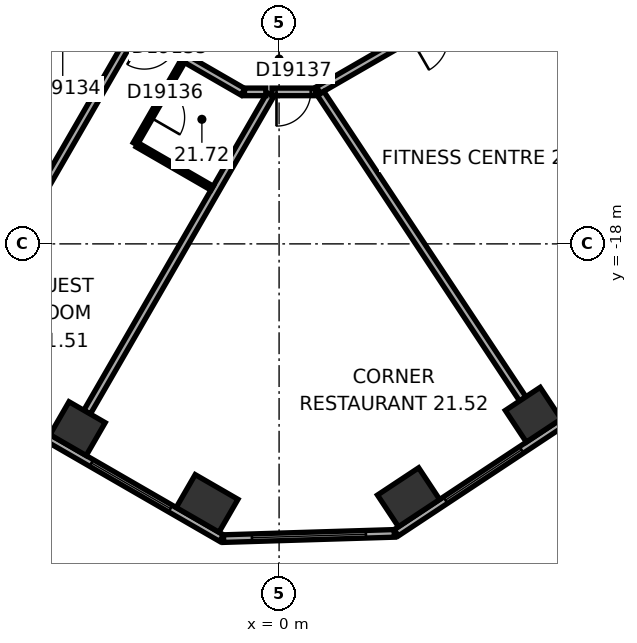
"""IFC4 building model, lengths in metres.
Left out: names, types, materials, properties, quantities, classifications, styles, units other than length and angle.
Written with IfcOpenShell. Run it as: python <this file> out.ifc"""

import sys

from ifc_helpers import new_model, si_unit, direction, frame, frame_2d, origin, origin_2d, place, context, subcontext, project, spatial, rectangle, extrude, element, fill, save


model = new_model("IFC4")
c1 = context("Model", 3, precision=1e-05, world=origin(), true_north=direction((0.0, 1.0)))
c2 = subcontext(c1, "Body", "Model", "MODEL_VIEW")
j1 = project(units=[si_unit("LENGTHUNIT", "METRE"), si_unit("PLANEANGLEUNIT", "RADIAN")], contexts=[c1])
p1 = place(None, origin())
s1 = spatial("IfcSite", under=j1, at=p1, CompositionType="ELEMENT")
p2 = place(p1, origin())
s2 = spatial("IfcBuilding", under=s1, at=p2, CompositionType="ELEMENT")
p3 = place(p2, frame((0.0, 0.0, 93.5)))
s3 = spatial("IfcBuildingStorey", under=s2, at=p3, CompositionType="ELEMENT", Elevation=93.5)
p4 = place(p3, frame((-5.302, -22.862, 0.0), z_axis=(0.0, 0.0, 1.0), x_axis=(0.866025403784, -0.5, 0.0)))
e1 = element("IfcColumn", 1, at=p4, inside=s3, PredefinedType="COLUMN", context=c2, shape_type="SweptSolid", body=[
    extrude(rectangle(XDim=1.1, YDim=1.0, at=origin_2d()), origin(), (0.0, 0.0, 1.0), 3.3),
])
for number, where, z_axis, x_axis in (
    (2, (-1.895, -24.829, 0.0), (0.0, 0.0, 1.0), (0.866, -0.5, 0.0)),
    (3, (3.407, -24.667, 0.0), (0.0, 0.0, 1.0), (0.834, 0.552, 0.0)),
):
    element("IfcColumn", number, at=place(p3, frame(where, z_axis=z_axis, x_axis=x_axis)), inside=s3, PredefinedType="COLUMN", context=c2, shape_type="SweptSolid", body=[
        extrude(rectangle(XDim=1.3, YDim=1.0, at=origin_2d()), origin(), (0.0, 0.0, 1.0), 3.3),
    ])
p5 = place(p3, frame((6.688, -22.496, 0.0), z_axis=(0.0, 0.0, 1.0), x_axis=(0.833885822067, 0.551936985312, 0.0)))
e4 = element("IfcColumn", 4, at=p5, inside=s3, PredefinedType="COLUMN", context=c2, shape_type="SweptSolid", body=[
    extrude(rectangle(XDim=1.1, YDim=1.0, at=origin_2d()), origin(), (0.0, 0.0, 1.0), 3.3),
])
p6 = place(p3, frame((-19.914, -15.119, 0.0), z_axis=(0.0, 0.0, 1.0), x_axis=(0.866025418898, -0.499999973822, 0.0)))
e5 = element("IfcWall", 5, at=p6, inside=s3, PredefinedType="STANDARD", context=c2, shape_type="SweptSolid", body=[
    extrude(rectangle(XDim=21.246, YDim=0.2, at=frame_2d((10.623, 0.0))), origin(), (0.0, 0.0, 1.0), 3.3),
])
p7 = place(p6, frame((1.555, 0.0, 0.8)))
e6 = element("IfcOpeningElement", 6, at=p7, cuts=e5, PredefinedType="OPENING", context=c2, shape_type="SweptSolid", body=[
    extrude(rectangle(XDim=2.4, YDim=1.7, at=frame_2d((1.2, 0.85))), frame((0.0, 0.11, 0.0), z_axis=(0.0, -1.0, 0.0), x_axis=(1.0, 0.0, 0.0)), (0.0, 0.0, 1.0), 0.22),
])
p8 = place(p6, frame((5.489, 0.0, 0.8)))
e7 = element("IfcOpeningElement", 7, at=p8, cuts=e5, PredefinedType="OPENING", context=c2, shape_type="SweptSolid", body=[
    extrude(rectangle(XDim=2.4, YDim=1.7, at=frame_2d((1.2, 0.85))), frame((0.0, 0.11, 0.0), z_axis=(0.0, -1.0, 0.0), x_axis=(1.0, 0.0, 0.0)), (0.0, 0.0, 1.0), 0.22),
])
p9 = place(p6, frame((9.424, 0.0, 0.8)))
e8 = element("IfcOpeningElement", 8, at=p9, cuts=e5, PredefinedType="OPENING", context=c2, shape_type="SweptSolid", body=[
    extrude(rectangle(XDim=2.4, YDim=1.7, at=frame_2d((1.2, 0.85))), frame((0.0, 0.11, 0.0), z_axis=(0.0, -1.0, 0.0), x_axis=(1.0, 0.0, 0.0)), (0.0, 0.0, 1.0), 0.22),
])
p10 = place(p6, frame((13.358, 0.0, 0.8)))
e9 = element("IfcOpeningElement", 9, at=p10, cuts=e5, PredefinedType="OPENING", context=c2, shape_type="SweptSolid", body=[
    extrude(rectangle(XDim=2.4, YDim=1.7, at=frame_2d((1.2, 0.85))), frame((0.0, 0.11, 0.0), z_axis=(0.0, -1.0, 0.0), x_axis=(1.0, 0.0, 0.0)), (0.0, 0.0, 1.0), 0.22),
])
p11 = place(p6, frame((17.293, 0.0, 0.8)))
e10 = element("IfcOpeningElement", 10, at=p11, cuts=e5, PredefinedType="OPENING", context=c2, shape_type="SweptSolid", body=[
    extrude(rectangle(XDim=2.4, YDim=1.7, at=frame_2d((1.2, 0.85))), frame((0.0, 0.11, 0.0), z_axis=(0.0, -1.0, 0.0), x_axis=(1.0, 0.0, 0.0)), (0.0, 0.0, 1.0), 0.22),
])
p12 = place(p3, frame((-1.461, -25.755, 0.0), z_axis=(0.0, 0.0, 1.0), x_axis=(0.999533823446, 0.030530898895, 0.0)))
e11 = element("IfcWall", 11, at=p12, inside=s3, PredefinedType="STANDARD", context=c2, shape_type="SweptSolid", body=[
    extrude(rectangle(XDim=4.494, YDim=0.2, at=frame_2d((2.247, 0.0))), origin(), (0.0, 0.0, 1.0), 3.3),
])
p13 = place(p12, frame((0.747, 0.0, 0.8)))
e12 = element("IfcOpeningElement", 12, at=p13, cuts=e11, PredefinedType="OPENING", context=c2, shape_type="SweptSolid", body=[
    extrude(rectangle(XDim=3.0, YDim=1.7, at=frame_2d((1.5, 0.85))), frame((0.0, 0.11, 0.0), z_axis=(0.0, -1.0, 0.0), x_axis=(1.0, 0.0, 0.0)), (0.0, 0.0, 1.0), 0.22),
])
p14 = place(p3, frame((3.083, -25.601, 0.0), z_axis=(0.0, 0.0, 1.0), x_axis=(0.833884295743, 0.551939291329, 0.0)))
e13 = element("IfcWall", 13, at=p14, inside=s3, PredefinedType="STANDARD", context=c2, shape_type="SweptSolid", body=[
    extrude(rectangle(XDim=21.246, YDim=0.2, at=frame_2d((10.623, 0.0))), origin(), (0.0, 0.0, 1.0), 3.3),
])
p15 = place(p14, frame((1.553, 0.0, 0.8)))
e14 = element("IfcOpeningElement", 14, at=p15, cuts=e13, PredefinedType="OPENING", context=c2, shape_type="SweptSolid", body=[
    extrude(rectangle(XDim=2.4, YDim=1.7, at=frame_2d((1.2, 0.85))), frame((0.0, 0.11, 0.0), z_axis=(0.0, -1.0, 0.0), x_axis=(1.0, 0.0, 0.0)), (0.0, 0.0, 1.0), 0.22),
])
p16 = place(p14, frame((5.488, 0.0, 0.8)))
e15 = element("IfcOpeningElement", 15, at=p16, cuts=e13, PredefinedType="OPENING", context=c2, shape_type="SweptSolid", body=[
    extrude(rectangle(XDim=2.4, YDim=1.7, at=frame_2d((1.2, 0.85))), frame((0.0, 0.11, 0.0), z_axis=(0.0, -1.0, 0.0), x_axis=(1.0, 0.0, 0.0)), (0.0, 0.0, 1.0), 0.22),
])
p17 = place(p14, frame((9.422, 0.0, 0.8)))
e16 = element("IfcOpeningElement", 16, at=p17, cuts=e13, PredefinedType="OPENING", context=c2, shape_type="SweptSolid", body=[
    extrude(rectangle(XDim=2.4, YDim=1.7, at=frame_2d((1.2, 0.85))), frame((0.0, 0.11, 0.0), z_axis=(0.0, -1.0, 0.0), x_axis=(1.0, 0.0, 0.0)), (0.0, 0.0, 1.0), 0.22),
])
p18 = place(p14, frame((13.357, 0.0, 0.8)))
e17 = element("IfcOpeningElement", 17, at=p18, cuts=e13, PredefinedType="OPENING", context=c2, shape_type="SweptSolid", body=[
    extrude(rectangle(XDim=2.4, YDim=1.7, at=frame_2d((1.2, 0.85))), frame((0.0, 0.11, 0.0), z_axis=(0.0, -1.0, 0.0), x_axis=(1.0, 0.0, 0.0)), (0.0, 0.0, 1.0), 0.22),
])
p19 = place(p14, frame((17.291, 0.0, 0.8)))
e18 = element("IfcOpeningElement", 18, at=p19, cuts=e13, PredefinedType="OPENING", context=c2, shape_type="SweptSolid", body=[
    extrude(rectangle(XDim=2.4, YDim=1.7, at=frame_2d((1.2, 0.85))), frame((0.0, 0.11, 0.0), z_axis=(0.0, -1.0, 0.0), x_axis=(1.0, 0.0, 0.0)), (0.0, 0.0, 1.0), 0.22),
])
p20 = place(p3, frame((-11.615, -7.843, 0.0), z_axis=(0.0, 0.0, 1.0), x_axis=(0.866026466995, -0.499998158461, 0.0)))
e19 = element("IfcWall", 19, at=p20, inside=s3, PredefinedType="PARTITIONING", context=c2, shape_type="SweptSolid", body=[
    extrude(rectangle(XDim=12.315, YDim=0.2, at=frame_2d((6.158, 0.0))), origin(), (0.0, 0.0, 1.0), 3.05),
])
p21 = place(p20, frame((1.665, 0.0, 0.0)))
e20 = element("IfcOpeningElement", 20, at=p21, cuts=e19, PredefinedType="OPENING", context=c2, shape_type="SweptSolid", body=[
    extrude(rectangle(XDim=0.9, YDim=2.1, at=frame_2d((0.45, 1.05))), frame((0.0, 0.11, 0.0), z_axis=(0.0, -1.0, 0.0), x_axis=(1.0, 0.0, 0.0)), (0.0, 0.0, 1.0), 0.22),
])
p22 = place(p20, frame((7.65, 0.0, 0.0)))
e21 = element("IfcOpeningElement", 21, at=p22, cuts=e19, PredefinedType="OPENING", context=c2, shape_type="SweptSolid", body=[
    extrude(rectangle(XDim=0.9, YDim=2.1, at=frame_2d((0.45, 1.05))), frame((0.0, 0.11, 0.0), z_axis=(0.0, -1.0, 0.0), x_axis=(1.0, 0.0, 0.0)), (0.0, 0.0, 1.0), 0.22),
])
p23 = place(p20, frame((9.317, 0.0, 0.0)))
e22 = element("IfcOpeningElement", 22, at=p23, cuts=e19, PredefinedType="OPENING", context=c2, shape_type="SweptSolid", body=[
    extrude(rectangle(XDim=0.9, YDim=2.1, at=frame_2d((0.45, 1.05))), frame((0.0, 0.11, 0.0), z_axis=(0.0, -1.0, 0.0), x_axis=(1.0, 0.0, 0.0)), (0.0, 0.0, 1.0), 0.22),
])
p24 = place(p3, frame((-8.46, -20.461, 0.0), z_axis=(0.0, 0.0, 1.0), x_axis=(0.499999662836, 0.866025598446, 0.0)))
e23 = element("IfcWall", 23, at=p24, inside=s3, PredefinedType="PARTITIONING", context=c2, shape_type="SweptSolid", body=[
    extrude(rectangle(XDim=9.25, YDim=0.2, at=frame_2d((4.625, 0.0))), origin(), (0.0, 0.0, 1.0), 3.05),
])
p25 = place(p3, frame((-5.51, -11.483, 0.0), z_axis=(0.0, 0.0, 1.0), x_axis=(-0.500004234368, -0.866022959057, 0.0)))
e24 = element("IfcWall", 24, at=p25, inside=s3, PredefinedType="PARTITIONING", context=c2, shape_type="SweptSolid", body=[
    extrude(rectangle(XDim=2.5, YDim=0.12, at=frame_2d((1.25, 0.0))), origin(), (0.0, 0.0, 1.0), 3.05),
])
p26 = place(p25, frame((0.8, 0.0, 0.0)))
e25 = element("IfcOpeningElement", 25, at=p26, cuts=e24, PredefinedType="OPENING", context=c2, shape_type="SweptSolid", body=[
    extrude(rectangle(XDim=0.9, YDim=2.1, at=frame_2d((0.45, 1.05))), frame((0.0, 0.07, 0.0), z_axis=(0.0, -1.0, 0.0), x_axis=(1.0, 0.0, 0.0)), (0.0, 0.0, 1.0), 0.14),
])
p27 = place(p3, frame((-5.052, -22.429, 0.0), z_axis=(0.0, 0.0, 1.0), x_axis=(0.50000569793, 0.866022114058, 0.0)))
e26 = element("IfcWall", 26, at=p27, inside=s3, PredefinedType="PARTITIONING", context=c2, shape_type="SweptSolid", body=[
    extrude(rectangle(XDim=9.65, YDim=0.2, at=frame_2d((4.825, 0.0))), origin(), (0.0, 0.0, 1.0), 3.05),
])
p28 = place(p3, frame((-3.786, -15.366, 0.0), z_axis=(0.0, 0.0, 1.0), x_axis=(0.500004234368, 0.866022959057, 0.0)))
e27 = element("IfcWall", 27, at=p28, inside=s3, PredefinedType="PARTITIONING", context=c2, shape_type="SweptSolid", body=[
    extrude(rectangle(XDim=2.5, YDim=0.12, at=frame_2d((1.25, 0.0))), origin(), (0.0, 0.0, 1.0), 3.05),
])
p29 = place(p28, frame((0.8, 0.0, 0.0)))
e28 = element("IfcOpeningElement", 28, at=p29, cuts=e27, PredefinedType="OPENING", context=c2, shape_type="SweptSolid", body=[
    extrude(rectangle(XDim=0.9, YDim=2.1, at=frame_2d((0.45, 1.05))), frame((0.0, 0.07, 0.0), z_axis=(0.0, -1.0, 0.0), x_axis=(1.0, 0.0, 0.0)), (0.0, 0.0, 1.0), 0.14),
])
p30 = place(p3, frame((-1.764, -16.533, 0.0), z_axis=(0.0, 0.0, 1.0), x_axis=(-0.866008641419, 0.500029032144, 0.0)))
e29 = element("IfcWall", 29, at=p30, inside=s3, PredefinedType="PARTITIONING", context=c2, shape_type="SweptSolid", body=[
    extrude(rectangle(XDim=2.275, YDim=0.12, at=frame_2d((1.137, 0.0))), origin(), (0.0, 0.0, 1.0), 3.05),
])
p31 = place(p3, frame((-0.91, -14.001, 0.0), z_axis=(0.0, 0.0, 1.0), x_axis=(1.0, 0.0, 0.0)))
e30 = element("IfcWall", 30, at=p31, inside=s3, PredefinedType="PARTITIONING", context=c2, shape_type="SweptSolid", body=[
    extrude(rectangle(XDim=0.56, YDim=0.2, at=frame_2d((0.28, 0.0))), origin(), (0.0, 0.0, 1.0), 3.05),
])
p32 = place(p3, frame((-0.186, -14.001, 0.0), z_axis=(0.0, 0.0, 1.0), x_axis=(1.0, 0.0, 0.0)))
e31 = element("IfcWall", 31, at=p32, inside=s3, PredefinedType="PARTITIONING", context=c2, shape_type="SweptSolid", body=[
    extrude(rectangle(XDim=1.136, YDim=0.2, at=frame_2d((0.568, 0.0))), origin(), (0.0, 0.0, 1.0), 3.05),
])
p33 = place(p32, frame((0.118, 0.0, 0.0)))
e32 = element("IfcOpeningElement", 32, at=p33, cuts=e31, PredefinedType="OPENING", context=c2, shape_type="SweptSolid", body=[
    extrude(rectangle(XDim=0.9, YDim=2.1, at=frame_2d((0.45, 1.05))), frame((0.0, 0.11, 0.0), z_axis=(0.0, -1.0, 0.0), x_axis=(1.0, 0.0, 0.0)), (0.0, 0.0, 1.0), 0.22),
])
p34 = place(p3, frame((1.033, -13.953, 0.0), z_axis=(0.0, 0.0, 1.0), x_axis=(0.866017531406, 0.500013635111, 0.0)))
e33 = element("IfcWall", 33, at=p34, inside=s3, PredefinedType="PARTITIONING", context=c2, shape_type="SweptSolid", body=[
    extrude(rectangle(XDim=6.58, YDim=0.2, at=frame_2d((3.29, 0.0))), origin(), (0.0, 0.0, 1.0), 3.05),
])
p35 = place(p34, frame((2.79, 0.0, 0.0)))
e34 = element("IfcOpeningElement", 34, at=p35, cuts=e33, PredefinedType="OPENING", context=c2, shape_type="SweptSolid", body=[
    extrude(rectangle(XDim=1.0, YDim=2.1, at=frame_2d((0.5, 1.05))), frame((0.0, 0.11, 0.0), z_axis=(0.0, -1.0, 0.0), x_axis=(1.0, 0.0, 0.0)), (0.0, 0.0, 1.0), 0.22),
])
p36 = place(p3, frame((6.412, -22.079, 0.0), z_axis=(0.0, 0.0, 1.0), x_axis=(-0.551919507115, 0.83389739037, 0.0)))
e35 = element("IfcWall", 35, at=p36, inside=s3, PredefinedType="PARTITIONING", context=c2, shape_type="SweptSolid", body=[
    extrude(rectangle(XDim=9.635, YDim=0.2, at=frame_2d((4.817, 0.0))), origin(), (0.0, 0.0, 1.0), 3.05),
])
p37 = place(p11, origin())
e36 = element("IfcWindow", 36, at=p37, inside=s3, PartitioningType="SINGLE_PANEL", PredefinedType="WINDOW", context=c2, shape_type="SweptSolid", body=[
    extrude(rectangle(XDim=2.4, YDim=1.7, at=frame_2d((1.2, 0.85))), frame((0.0, 0.03, 0.0), z_axis=(0.0, -1.0, 0.0), x_axis=(1.0, 0.0, 0.0)), (0.0, 0.0, 1.0), 0.06),
])
fill(e10, e36)
p38 = place(p13, origin())
e37 = element("IfcWindow", 37, at=p38, inside=s3, PartitioningType="SINGLE_PANEL", PredefinedType="WINDOW", context=c2, shape_type="SweptSolid", body=[
    extrude(rectangle(XDim=3.0, YDim=1.7, at=frame_2d((1.5, 0.85))), frame((0.0, 0.03, 0.0), z_axis=(0.0, -1.0, 0.0), x_axis=(1.0, 0.0, 0.0)), (0.0, 0.0, 1.0), 0.06),
])
fill(e12, e37)
p39 = place(p15, origin())
e38 = element("IfcWindow", 38, at=p39, inside=s3, PartitioningType="SINGLE_PANEL", PredefinedType="WINDOW", context=c2, shape_type="SweptSolid", body=[
    extrude(rectangle(XDim=2.4, YDim=1.7, at=frame_2d((1.2, 0.85))), frame((0.0, 0.03, 0.0), z_axis=(0.0, -1.0, 0.0), x_axis=(1.0, 0.0, 0.0)), (0.0, 0.0, 1.0), 0.06),
])
fill(e14, e38)
p40 = place(p26, origin())
e39 = element("IfcDoor", 39, at=p40, inside=s3, OperationType="SINGLE_SWING_LEFT", PredefinedType="DOOR", context=c2, shape_type="SweptSolid", body=[
    extrude(rectangle(XDim=0.9, YDim=2.1, at=frame_2d((0.45, 1.05))), frame((0.0, 0.025, 0.0), z_axis=(0.0, -1.0, 0.0), x_axis=(1.0, 0.0, 0.0)), (0.0, 0.0, 1.0), 0.05),
])
fill(e25, e39)
p41 = place(p23, origin())
e40 = element("IfcDoor", 40, at=p41, inside=s3, OperationType="SINGLE_SWING_LEFT", PredefinedType="DOOR", context=c2, shape_type="SweptSolid", body=[
    extrude(rectangle(XDim=0.9, YDim=2.1, at=frame_2d((0.45, 1.05))), frame((0.0, 0.025, 0.0), z_axis=(0.0, -1.0, 0.0), x_axis=(1.0, 0.0, 0.0)), (0.0, 0.0, 1.0), 0.05),
])
fill(e22, e40)
p42 = place(p29, origin())
e41 = element("IfcDoor", 41, at=p42, inside=s3, OperationType="SINGLE_SWING_LEFT", PredefinedType="DOOR", context=c2, shape_type="SweptSolid", body=[
    extrude(rectangle(XDim=0.9, YDim=2.1, at=frame_2d((0.45, 1.05))), frame((0.0, 0.025, 0.0), z_axis=(0.0, -1.0, 0.0), x_axis=(1.0, 0.0, 0.0)), (0.0, 0.0, 1.0), 0.05),
])
fill(e28, e41)
p43 = place(p33, origin())
e42 = element("IfcDoor", 42, at=p43, inside=s3, OperationType="SINGLE_SWING_LEFT", PredefinedType="DOOR", context=c2, shape_type="SweptSolid", body=[
    extrude(rectangle(XDim=0.9, YDim=2.1, at=frame_2d((0.45, 1.05))), frame((0.0, 0.025, 0.0), z_axis=(0.0, -1.0, 0.0), x_axis=(1.0, 0.0, 0.0)), (0.0, 0.0, 1.0), 0.05),
])
fill(e32, e42)
save(model, sys.argv[1])
